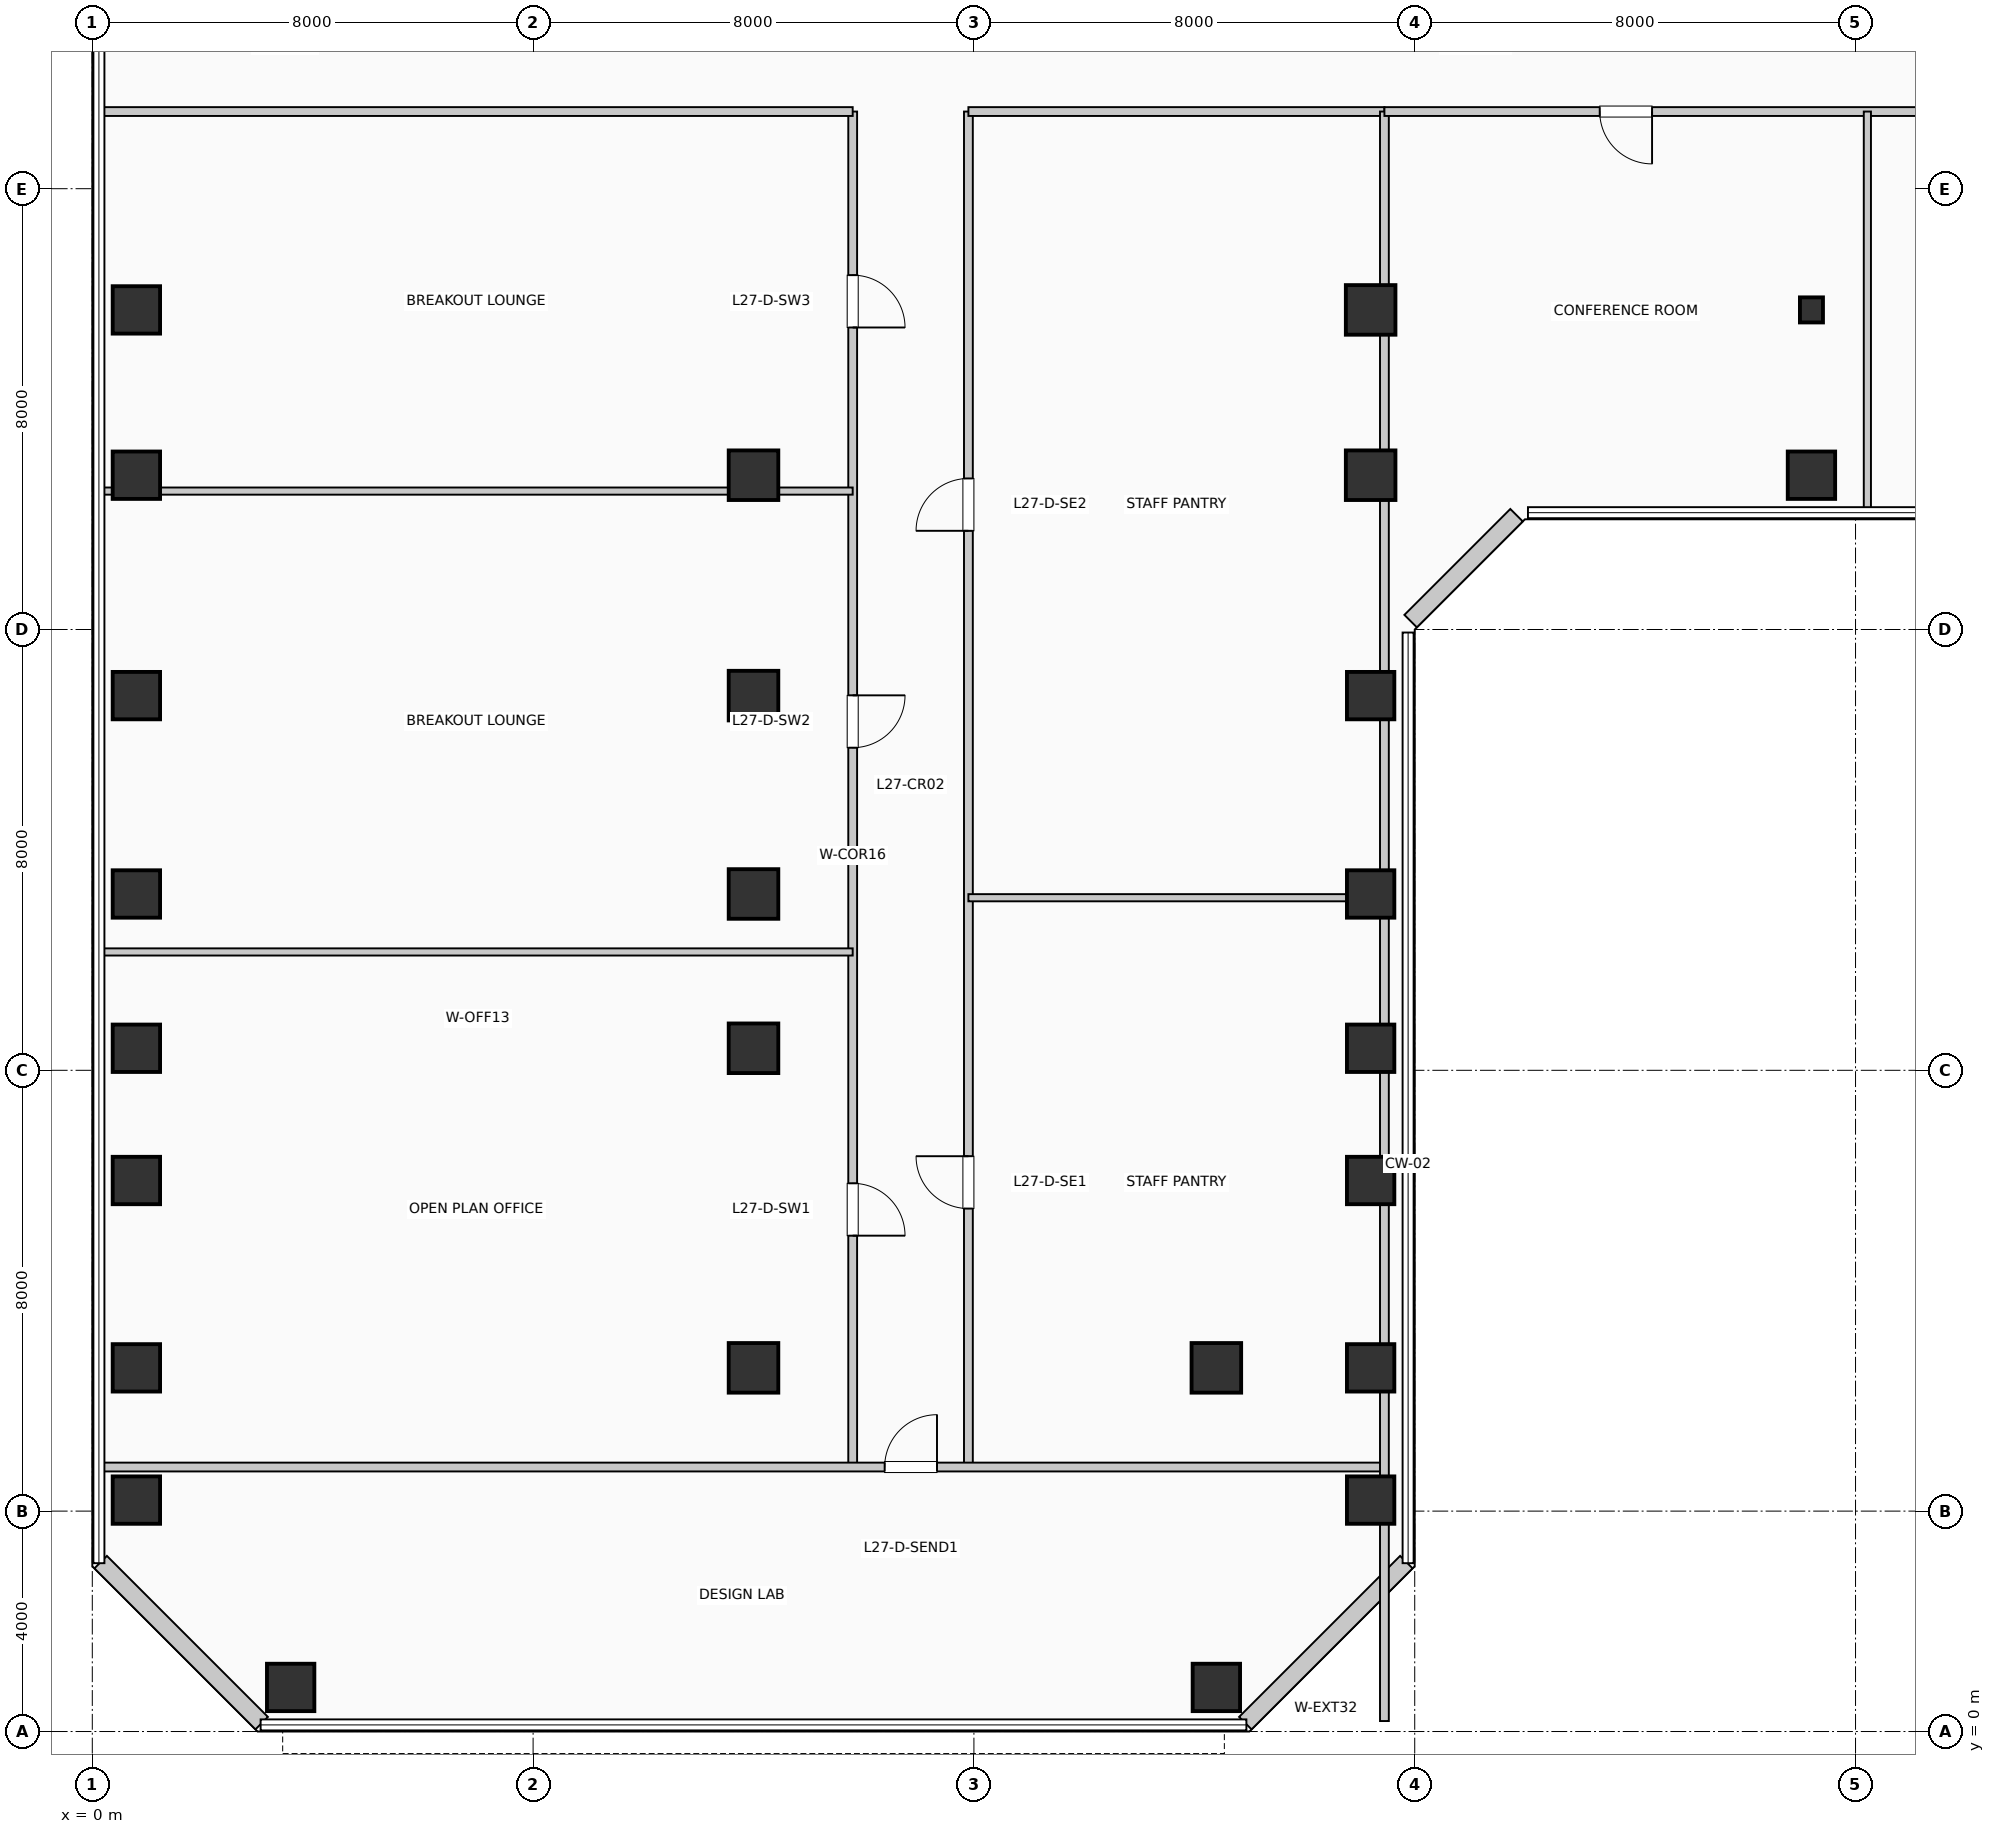
"""IFC4 building model, lengths in metres.
Left out: names, types, materials, properties, quantities, classifications, styles, units other than length and angle.
Written with IfcOpenShell. Run it as: python <this file> out.ifc"""

import sys

from ifc_helpers import new_model, si_unit, direction, frame, frame_2d, origin, origin_2d, place, context, subcontext, project, spatial, rectangle, i_section, extrude, element, fill, save


model = new_model("IFC4")
c1 = context("Model", 3, precision=1e-05, world=origin(), true_north=direction((0.0, 1.0)))
c2 = subcontext(c1, "Body", "Model", "MODEL_VIEW")
j1 = project(units=[si_unit("LENGTHUNIT", "METRE"), si_unit("PLANEANGLEUNIT", "RADIAN")], contexts=[c1])
p1 = place(None, origin())
s1 = spatial("IfcSite", under=j1, at=p1, CompositionType="ELEMENT")
p2 = place(p1, origin())
s2 = spatial("IfcBuilding", under=s1, at=p2, CompositionType="ELEMENT")
p3 = place(p2, frame((0.0, 0.0, 114.51)))
s3 = spatial("IfcBuildingStorey", under=s2, at=p3, CompositionType="ELEMENT", Elevation=114.51)
for number, where, z_axis, x_axis in (
    (1, (0.8, 4.2, 0.0), (0.0, 0.0, 1.0), (1.0, 0.0, 0.0)),
    (2, (0.8, 6.6, 0.0), (0.0, 0.0, 1.0), (1.0, 0.0, 0.0)),
    (3, (0.8, 10.0, 0.0), (0.0, 0.0, 1.0), (1.0, 0.0, 0.0)),
    (4, (0.8, 12.4, 0.0), (0.0, 0.0, 1.0), (1.0, 0.0, 0.0)),
    (5, (0.8, 15.2, 0.0), (0.0, 0.0, 1.0), (1.0, 0.0, 0.0)),
    (6, (0.8, 18.8, 0.0), (0.0, 0.0, 1.0), (1.0, 0.0, 0.0)),
    (7, (0.8, 22.8, 0.0), (0.0, 0.0, 1.0), (1.0, 0.0, 0.0)),
    (8, (0.8, 25.8, 0.0), (0.0, 0.0, 1.0), (1.0, 0.0, 0.0)),
    (9, (3.6, 0.8, 0.0), (0.0, 0.0, 1.0), (1.0, 0.0, 0.0)),
):
    element("IfcColumn", number, at=place(p3, frame(where, z_axis=z_axis, x_axis=x_axis)), inside=s3, PredefinedType="COLUMN", context=c2, shape_type="SweptSolid", body=[
        extrude(rectangle(XDim=0.86, YDim=0.86, at=origin_2d()), origin(), (0.0, 0.0, 1.0), 3.96),
    ])
for number, where, z_axis, x_axis in (
    (10, (12.0, 6.6, 0.0), (0.0, 0.0, 1.0), (1.0, 0.0, 0.0)),
    (11, (12.0, 12.4, 0.0), (0.0, 0.0, 1.0), (1.0, 0.0, 0.0)),
    (12, (12.0, 15.2, 0.0), (0.0, 0.0, 1.0), (1.0, 0.0, 0.0)),
    (13, (12.0, 18.8, 0.0), (0.0, 0.0, 1.0), (1.0, 0.0, 0.0)),
    (14, (12.0, 22.8, 0.0), (0.0, 0.0, 1.0), (1.0, 0.0, 0.0)),
):
    element("IfcColumn", number, at=place(p3, frame(where, z_axis=z_axis, x_axis=x_axis)), inside=s3, PredefinedType="COLUMN", context=c2, shape_type="SweptSolid", body=[
        extrude(rectangle(XDim=0.9, YDim=0.9, at=origin_2d()), origin(), (0.0, 0.0, 1.0), 3.96),
    ])
p4 = place(p3, frame((20.4, 0.8, 0.0), z_axis=(0.0, 0.0, 1.0), x_axis=(1.0, 0.0, 0.0)))
e15 = element("IfcColumn", 15, at=p4, inside=s3, PredefinedType="COLUMN", context=c2, shape_type="SweptSolid", body=[
    extrude(rectangle(XDim=0.86, YDim=0.86, at=origin_2d()), origin(), (0.0, 0.0, 1.0), 3.96),
])
p5 = place(p3, frame((20.4, 6.6, 0.0), z_axis=(0.0, 0.0, 1.0), x_axis=(1.0, 0.0, 0.0)))
e16 = element("IfcColumn", 16, at=p5, inside=s3, PredefinedType="COLUMN", context=c2, shape_type="SweptSolid", body=[
    extrude(rectangle(XDim=0.9, YDim=0.9, at=origin_2d()), origin(), (0.0, 0.0, 1.0), 3.96),
])
for number, where, z_axis, x_axis in (
    (17, (23.2, 4.2, 0.0), (0.0, 0.0, 1.0), (1.0, 0.0, 0.0)),
    (18, (23.2, 6.6, 0.0), (0.0, 0.0, 1.0), (1.0, 0.0, 0.0)),
    (19, (23.2, 10.0, 0.0), (0.0, 0.0, 1.0), (1.0, 0.0, 0.0)),
    (20, (23.2, 12.4, 0.0), (0.0, 0.0, 1.0), (1.0, 0.0, 0.0)),
    (21, (23.2, 15.2, 0.0), (0.0, 0.0, 1.0), (1.0, 0.0, 0.0)),
    (22, (23.2, 18.8, 0.0), (0.0, 0.0, 1.0), (1.0, 0.0, 0.0)),
):
    element("IfcColumn", number, at=place(p3, frame(where, z_axis=z_axis, x_axis=x_axis)), inside=s3, PredefinedType="COLUMN", context=c2, shape_type="SweptSolid", body=[
        extrude(rectangle(XDim=0.86, YDim=0.86, at=origin_2d()), origin(), (0.0, 0.0, 1.0), 3.96),
    ])
for number, where, z_axis, x_axis in (
    (23, (23.2, 22.8, 0.0), (0.0, 0.0, 1.0), (1.0, 0.0, 0.0)),
    (24, (23.2, 25.8, 0.0), (0.0, 0.0, 1.0), (1.0, 0.0, 0.0)),
):
    element("IfcColumn", number, at=place(p3, frame(where, z_axis=z_axis, x_axis=x_axis)), inside=s3, PredefinedType="COLUMN", context=c2, shape_type="SweptSolid", body=[
        extrude(rectangle(XDim=0.9, YDim=0.9, at=origin_2d()), origin(), (0.0, 0.0, 1.0), 3.96),
    ])
p6 = place(p3, frame((31.2, 22.8, 0.0), z_axis=(0.0, 0.0, 1.0), x_axis=(1.0, 0.0, 0.0)))
e25 = element("IfcColumn", 25, at=p6, inside=s3, PredefinedType="COLUMN", context=c2, shape_type="SweptSolid", body=[
    extrude(rectangle(XDim=0.86, YDim=0.86, at=origin_2d()), origin(), (0.0, 0.0, 1.0), 3.96),
])
p7 = place(p3, frame((31.2, 25.8, 0.0), z_axis=(0.0, 0.0, 1.0), x_axis=(1.0, 0.0, 0.0)))
e26 = element("IfcColumn", 26, at=p7, inside=s3, PredefinedType="COLUMN", context=c2, shape_type="SweptSolid", body=[
    extrude(i_section(OverallWidth=0.418, OverallDepth=0.455, WebThickness=0.032, FlangeThickness=0.051, at=origin_2d()), origin(), (0.0, 0.0, 1.0), 3.96),
])
p8 = place(p3, frame((20.926, 0.152, 0.0), z_axis=(0.0, 0.0, 1.0), x_axis=(0.707106781187, 0.707106781187, 0.0)))
e27 = element("IfcWall", 27, at=p8, inside=s3, PredefinedType="SOLIDWALL", context=c2, shape_type="SweptSolid", body=[
    extrude(rectangle(XDim=4.133, YDim=0.32, at=frame_2d((2.066, 0.0))), origin(), (0.0, 0.0, 1.0), 3.71),
])
p9 = place(p3, frame((23.926, 20.152, 0.0), z_axis=(0.0, 0.0, 1.0), x_axis=(0.707106781187, 0.707106781187, 0.0)))
e28 = element("IfcWall", 28, at=p9, inside=s3, PredefinedType="SOLIDWALL", context=c2, shape_type="SweptSolid", body=[
    extrude(rectangle(XDim=2.718, YDim=0.32, at=frame_2d((1.359, 0.0))), origin(), (0.0, 0.0, 1.0), 3.71),
])
p10 = place(p3, frame((0.152, 3.074, 0.0), z_axis=(0.0, 0.0, 1.0), x_axis=(0.707106781187, -0.707106781187, 0.0)))
e29 = element("IfcWall", 29, at=p10, inside=s3, PredefinedType="SOLIDWALL", context=c2, shape_type="SweptSolid", body=[
    extrude(rectangle(XDim=4.133, YDim=0.32, at=frame_2d((2.066, 0.0))), origin(), (0.0, 0.0, 1.0), 3.71),
])
p11 = place(p3, frame((13.8, 4.8, 0.0), z_axis=(0.0, 0.0, 1.0), x_axis=(0.0, 1.0, 0.0)))
e30 = element("IfcWall", 30, at=p11, inside=s3, PredefinedType="PARTITIONING", context=c2, shape_type="SweptSolid", body=[
    extrude(rectangle(XDim=24.6, YDim=0.16, at=frame_2d((12.3, 0.0))), origin(), (0.0, 0.0, 1.0), 3.71),
])
p12 = place(p11, frame((5.149, 0.0, 0.0), z_axis=(0.0, 0.0, 1.0), x_axis=(-1.0, 0.0, 0.0)))
e31 = element("IfcOpeningElement", 31, at=p12, cuts=e30, PredefinedType="OPENING", context=c2, shape_type="SweptSolid", body=[
    extrude(rectangle(XDim=0.95, YDim=2.15, at=frame_2d((0.475, 1.075))), frame((0.0, 0.09, 0.0), z_axis=(0.0, -1.0, 0.0), x_axis=(1.0, 0.0, 0.0)), (0.0, 0.0, 1.0), 0.18),
])
p13 = place(p11, frame((14.005, 0.0, 0.0), z_axis=(0.0, 0.0, 1.0), x_axis=(-1.0, 0.0, 0.0)))
e32 = element("IfcOpeningElement", 32, at=p13, cuts=e30, PredefinedType="OPENING", context=c2, shape_type="SweptSolid", body=[
    extrude(rectangle(XDim=0.95, YDim=2.15, at=frame_2d((0.475, 1.075))), frame((0.0, 0.09, 0.0), z_axis=(0.0, -1.0, 0.0), x_axis=(1.0, 0.0, 0.0)), (0.0, 0.0, 1.0), 0.18),
])
p14 = place(p11, frame((21.631, 0.0, 0.0), z_axis=(0.0, 0.0, 1.0), x_axis=(-1.0, 0.0, 0.0)))
e33 = element("IfcOpeningElement", 33, at=p14, cuts=e30, PredefinedType="OPENING", context=c2, shape_type="SweptSolid", body=[
    extrude(rectangle(XDim=0.95, YDim=2.15, at=frame_2d((0.475, 1.075))), frame((0.0, 0.09, 0.0), z_axis=(0.0, -1.0, 0.0), x_axis=(1.0, 0.0, 0.0)), (0.0, 0.0, 1.0), 0.18),
])
p15 = place(p3, frame((15.9, 4.8, 0.0), z_axis=(0.0, 0.0, 1.0), x_axis=(0.0, 1.0, 0.0)))
e34 = element("IfcWall", 34, at=p15, inside=s3, PredefinedType="PARTITIONING", context=c2, shape_type="SweptSolid", body=[
    extrude(rectangle(XDim=24.6, YDim=0.16, at=frame_2d((12.3, 0.0))), origin(), (0.0, 0.0, 1.0), 3.71),
])
p16 = place(p15, frame((4.691, 0.0, 0.0)))
e35 = element("IfcOpeningElement", 35, at=p16, cuts=e34, PredefinedType="OPENING", context=c2, shape_type="SweptSolid", body=[
    extrude(rectangle(XDim=0.95, YDim=2.15, at=frame_2d((0.475, 1.075))), frame((0.0, 0.09, 0.0), z_axis=(0.0, -1.0, 0.0), x_axis=(1.0, 0.0, 0.0)), (0.0, 0.0, 1.0), 0.18),
])
p17 = place(p15, frame((16.991, 0.0, 0.0)))
e36 = element("IfcOpeningElement", 36, at=p17, cuts=e34, PredefinedType="OPENING", context=c2, shape_type="SweptSolid", body=[
    extrude(rectangle(XDim=0.95, YDim=2.15, at=frame_2d((0.475, 1.075))), frame((0.0, 0.09, 0.0), z_axis=(0.0, -1.0, 0.0), x_axis=(1.0, 0.0, 0.0)), (0.0, 0.0, 1.0), 0.18),
])
p18 = place(p3, frame((0.19, 4.8, 0.0), z_axis=(0.0, 0.0, 1.0), x_axis=(1.0, 0.0, 0.0)))
e37 = element("IfcWall", 37, at=p18, inside=s3, PredefinedType="PARTITIONING", context=c2, shape_type="SweptSolid", body=[
    extrude(rectangle(XDim=23.26, YDim=0.16, at=frame_2d((11.63, 0.0))), origin(), (0.0, 0.0, 1.0), 3.71),
])
p19 = place(p18, frame((14.19, 0.0, 0.0)))
e38 = element("IfcOpeningElement", 38, at=p19, cuts=e37, PredefinedType="OPENING", context=c2, shape_type="SweptSolid", body=[
    extrude(rectangle(XDim=0.95, YDim=2.15, at=frame_2d((0.475, 1.075))), frame((0.0, 0.09, 0.0), z_axis=(0.0, -1.0, 0.0), x_axis=(1.0, 0.0, 0.0)), (0.0, 0.0, 1.0), 0.18),
])
p20 = place(p3, frame((0.19, 29.4, 0.0), z_axis=(0.0, 0.0, 1.0), x_axis=(1.0, 0.0, 0.0)))
e39 = element("IfcWall", 39, at=p20, inside=s3, PredefinedType="PARTITIONING", context=c2, shape_type="SweptSolid", body=[
    extrude(rectangle(XDim=13.61, YDim=0.16, at=frame_2d((6.805, 0.0))), origin(), (0.0, 0.0, 1.0), 3.365),
])
p21 = place(p3, frame((15.9, 29.4, 0.0), z_axis=(0.0, 0.0, 1.0), x_axis=(1.0, 0.0, 0.0)))
e40 = element("IfcWall", 40, at=p21, inside=s3, PredefinedType="PARTITIONING", context=c2, shape_type="SweptSolid", body=[
    extrude(rectangle(XDim=7.55, YDim=0.16, at=frame_2d((3.775, 0.0))), origin(), (0.0, 0.0, 1.0), 3.71),
])
p22 = place(p3, frame((23.45, 0.19, 0.0), z_axis=(0.0, 0.0, 1.0), x_axis=(0.0, 1.0, 0.0)))
e41 = element("IfcWall", 41, at=p22, inside=s3, PredefinedType="PARTITIONING", context=c2, shape_type="SweptSolid", body=[
    extrude(rectangle(XDim=29.21, YDim=0.16, at=frame_2d((14.605, 0.0))), origin(), (0.0, 0.0, 1.0), 3.045),
])
p23 = place(p3, frame((0.19, 14.148, 0.0), z_axis=(0.0, 0.0, 1.0), x_axis=(1.0, 0.0, 0.0)))
e42 = element("IfcWall", 42, at=p23, inside=s3, PredefinedType="PARTITIONING", context=c2, shape_type="SweptSolid", body=[
    extrude(rectangle(XDim=13.61, YDim=0.13, at=frame_2d((6.805, 0.0))), origin(), (0.0, 0.0, 1.0), 3.71),
])
p24 = place(p3, frame((0.19, 22.512, 0.0), z_axis=(0.0, 0.0, 1.0), x_axis=(1.0, 0.0, 0.0)))
e43 = element("IfcWall", 43, at=p24, inside=s3, PredefinedType="PARTITIONING", context=c2, shape_type="SweptSolid", body=[
    extrude(rectangle(XDim=13.61, YDim=0.13, at=frame_2d((6.805, 0.0))), origin(), (0.0, 0.0, 1.0), 3.045),
])
p25 = place(p3, frame((15.9, 15.132, 0.0), z_axis=(0.0, 0.0, 1.0), x_axis=(1.0, 0.0, 0.0)))
e44 = element("IfcWall", 44, at=p25, inside=s3, PredefinedType="PARTITIONING", context=c2, shape_type="SweptSolid", body=[
    extrude(rectangle(XDim=7.55, YDim=0.13, at=frame_2d((3.775, 0.0))), origin(), (0.0, 0.0, 1.0), 3.045),
])
p26 = place(p3, frame((23.45, 29.4, 0.0), z_axis=(0.0, 0.0, 1.0), x_axis=(1.0, 0.0, 0.0)))
e45 = element("IfcWall", 45, at=p26, inside=s3, PredefinedType="PARTITIONING", context=c2, shape_type="SweptSolid", body=[
    extrude(rectangle(XDim=26.56, YDim=0.16, at=frame_2d((13.28, 0.0))), origin(), (0.0, 0.0, 1.0), 3.365),
])
p27 = place(p26, frame((4.857, 0.0, 0.0), z_axis=(0.0, 0.0, 1.0), x_axis=(-1.0, 0.0, 0.0)))
e46 = element("IfcOpeningElement", 46, at=p27, cuts=e45, PredefinedType="OPENING", context=c2, shape_type="SweptSolid", body=[
    extrude(rectangle(XDim=0.95, YDim=2.15, at=frame_2d((0.475, 1.075))), frame((0.0, 0.09, 0.0), z_axis=(0.0, -1.0, 0.0), x_axis=(1.0, 0.0, 0.0)), (0.0, 0.0, 1.0), 0.18),
])
p28 = place(p26, frame((13.622, 0.0, 0.0), z_axis=(0.0, 0.0, 1.0), x_axis=(-1.0, 0.0, 0.0)))
e47 = element("IfcOpeningElement", 47, at=p28, cuts=e45, PredefinedType="OPENING", context=c2, shape_type="SweptSolid", body=[
    extrude(rectangle(XDim=0.95, YDim=2.15, at=frame_2d((0.475, 1.075))), frame((0.0, 0.09, 0.0), z_axis=(0.0, -1.0, 0.0), x_axis=(1.0, 0.0, 0.0)), (0.0, 0.0, 1.0), 0.18),
])
p29 = place(p26, frame((22.52, 0.0, 0.0), z_axis=(0.0, 0.0, 1.0), x_axis=(-1.0, 0.0, 0.0)))
e48 = element("IfcOpeningElement", 48, at=p29, cuts=e45, PredefinedType="OPENING", context=c2, shape_type="SweptSolid", body=[
    extrude(rectangle(XDim=0.95, YDim=2.15, at=frame_2d((0.475, 1.075))), frame((0.0, 0.09, 0.0), z_axis=(0.0, -1.0, 0.0), x_axis=(1.0, 0.0, 0.0)), (0.0, 0.0, 1.0), 0.18),
])
p30 = place(p3, frame((32.215, 22.19, 0.0), z_axis=(0.0, 0.0, 1.0), x_axis=(0.0, 1.0, 0.0)))
e49 = element("IfcWall", 49, at=p30, inside=s3, PredefinedType="PARTITIONING", context=c2, shape_type="SweptSolid", body=[
    extrude(rectangle(XDim=7.21, YDim=0.13, at=frame_2d((3.605, 0.0))), origin(), (0.0, 0.0, 1.0), 3.71),
])
p31 = place(p19, origin())
e50 = element("IfcDoor", 50, at=p31, inside=s3, OperationType="SINGLE_SWING_RIGHT", PredefinedType="DOOR", context=c2, shape_type="SweptSolid", body=[
    extrude(rectangle(XDim=0.95, YDim=2.15, at=frame_2d((0.475, 1.075))), frame((0.0, 0.025, 0.0), z_axis=(0.0, -1.0, 0.0), x_axis=(1.0, 0.0, 0.0)), (0.0, 0.0, 1.0), 0.05),
])
fill(e38, e50)
p32 = place(p12, origin())
e51 = element("IfcDoor", 51, at=p32, inside=s3, OperationType="SINGLE_SWING_LEFT", PredefinedType="DOOR", context=c2, shape_type="SweptSolid", body=[
    extrude(rectangle(XDim=0.95, YDim=2.15, at=frame_2d((0.475, 1.075))), frame((0.0, 0.025, 0.0), z_axis=(0.0, -1.0, 0.0), x_axis=(1.0, 0.0, 0.0)), (0.0, 0.0, 1.0), 0.05),
])
fill(e31, e51)
p33 = place(p13, origin())
e52 = element("IfcDoor", 52, at=p33, inside=s3, OperationType="SINGLE_SWING_RIGHT", PredefinedType="DOOR", context=c2, shape_type="SweptSolid", body=[
    extrude(rectangle(XDim=0.95, YDim=2.15, at=frame_2d((0.475, 1.075))), frame((0.0, 0.025, 0.0), z_axis=(0.0, -1.0, 0.0), x_axis=(1.0, 0.0, 0.0)), (0.0, 0.0, 1.0), 0.05),
])
fill(e32, e52)
p34 = place(p14, origin())
e53 = element("IfcDoor", 53, at=p34, inside=s3, OperationType="SINGLE_SWING_LEFT", PredefinedType="DOOR", context=c2, shape_type="SweptSolid", body=[
    extrude(rectangle(XDim=0.95, YDim=2.15, at=frame_2d((0.475, 1.075))), frame((0.0, 0.025, 0.0), z_axis=(0.0, -1.0, 0.0), x_axis=(1.0, 0.0, 0.0)), (0.0, 0.0, 1.0), 0.05),
])
fill(e33, e53)
p35 = place(p16, origin())
e54 = element("IfcDoor", 54, at=p35, inside=s3, OperationType="SINGLE_SWING_RIGHT", PredefinedType="DOOR", context=c2, shape_type="SweptSolid", body=[
    extrude(rectangle(XDim=0.95, YDim=2.15, at=frame_2d((0.475, 1.075))), frame((0.0, 0.025, 0.0), z_axis=(0.0, -1.0, 0.0), x_axis=(1.0, 0.0, 0.0)), (0.0, 0.0, 1.0), 0.05),
])
fill(e35, e54)
p36 = place(p17, origin())
e55 = element("IfcDoor", 55, at=p36, inside=s3, OperationType="SINGLE_SWING_LEFT", PredefinedType="DOOR", context=c2, shape_type="SweptSolid", body=[
    extrude(rectangle(XDim=0.95, YDim=2.15, at=frame_2d((0.475, 1.075))), frame((0.0, 0.025, 0.0), z_axis=(0.0, -1.0, 0.0), x_axis=(1.0, 0.0, 0.0)), (0.0, 0.0, 1.0), 0.05),
])
fill(e36, e55)
p37 = place(p27, origin())
e56 = element("IfcDoor", 56, at=p37, inside=s3, OperationType="SINGLE_SWING_RIGHT", PredefinedType="DOOR", context=c2, shape_type="SweptSolid", body=[
    extrude(rectangle(XDim=0.95, YDim=2.15, at=frame_2d((0.475, 1.075))), frame((0.0, 0.025, 0.0), z_axis=(0.0, -1.0, 0.0), x_axis=(1.0, 0.0, 0.0)), (0.0, 0.0, 1.0), 0.05),
])
fill(e46, e56)
save(model, sys.argv[1])
